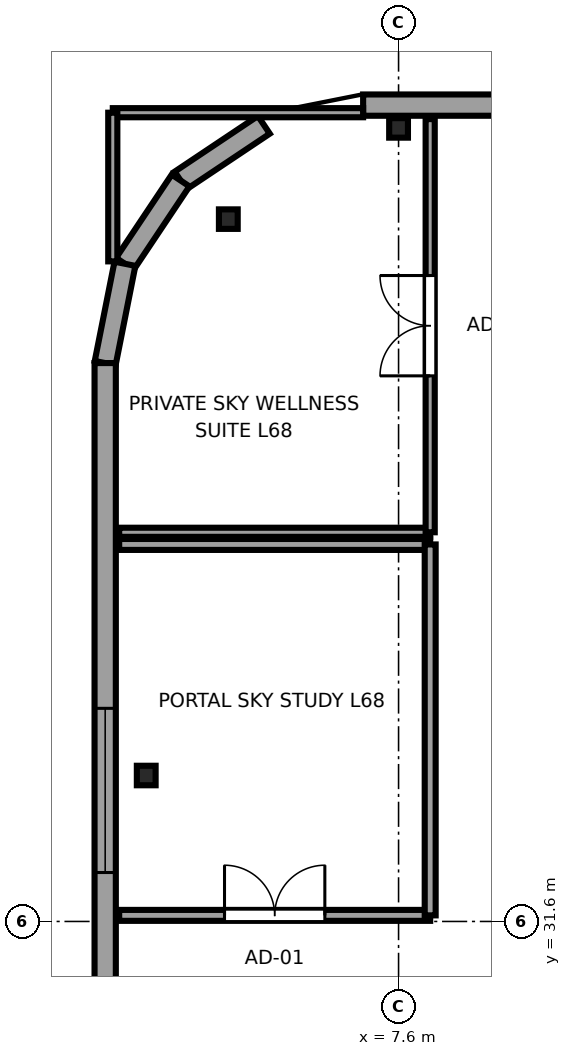
"""IFC4 building model, lengths in metres.
Left out: names, types, materials, properties, quantities, classifications, styles, units other than length and angle.
Written with IfcOpenShell. Run it as: python <this file> out.ifc"""

import sys

from ifc_helpers import new_model, si_unit, direction, frame, frame_2d, origin, origin_2d, place, context, subcontext, project, spatial, rectangle, i_section, extrude, source, transform, mapped, element, fill, save


model = new_model("IFC4")
c1 = context("Model", 3, precision=1e-05, world=origin(), true_north=direction((0.0, 1.0)))
c2 = subcontext(c1, "Body", "Model", "MODEL_VIEW")
j1 = project(units=[si_unit("LENGTHUNIT", "METRE"), si_unit("PLANEANGLEUNIT", "RADIAN")], contexts=[c1])
p1 = place(None, origin())
s1 = spatial("IfcSite", under=j1, at=p1, CompositionType="ELEMENT")
p2 = place(p1, origin())
s2 = spatial("IfcBuilding", under=s1, at=p2, CompositionType="ELEMENT")
p3 = place(p2, frame((0.0, 0.0, 255.85)))
s3 = spatial("IfcBuildingStorey", under=s2, at=p3, CompositionType="ELEMENT", Elevation=255.85)
m1 = source(origin(), c2, "Body", "SweptSolid", [
    extrude(i_section(OverallWidth=0.309, OverallDepth=0.321, WebThickness=0.014, FlangeThickness=0.022, FilletRadius=0.017, at=origin_2d()), origin(), (0.0, 0.0, 1.0), 3.55),
])
for number, where, z_axis, x_axis in (
    (1, (4.8, 43.15, 0.0), (0.0, 0.0, 1.0), (1.0, 0.0, 0.0)),
    (2, (7.6, 44.65, 0.0), (0.0, 0.0, 1.0), (1.0, 0.0, 0.0)),
    (3, (3.45, 34.0, 0.0), (0.0, 0.0, 1.0), (1.0, 0.0, 0.0)),
):
    element("IfcColumn", number, at=place(p3, frame(where, z_axis=z_axis, x_axis=x_axis)), inside=s3, PredefinedType="COLUMN", context=c2, shape_type="MappedRepresentation", body=[
        mapped(m1, transform((0.0, 0.0, 0.0), x_axis=(1.0, 0.0, 0.0), y_axis=(0.0, 1.0, 0.0), z_axis=(0.0, 0.0, 1.0), scale=1.0)),
    ])
p4 = place(p3, frame((9.996, 45.025, 0.0), z_axis=(0.0, 0.0, 1.0), x_axis=(-1.0, 0.0, 0.0)))
e4 = element("IfcWall", 4, at=p4, inside=s3, PredefinedType="SOLIDWALL", context=c2, shape_type="SweptSolid", body=[
    extrude(rectangle(XDim=2.979, YDim=0.35, at=frame_2d((1.49, 0.0))), origin(), (0.0, 0.0, 1.0), 2.16),
])
for number, where, z_axis, x_axis in (
    (5, (5.385, 44.7, 0.0), (0.0, 0.0, 1.0), (-0.832, -0.556, 0.0)),
    (6, (4.015, 43.785, 0.0), (0.0, 0.0, 1.0), (-0.556, -0.831, 0.0)),
):
    element("IfcWall", number, at=place(p3, frame(where, z_axis=z_axis, x_axis=x_axis)), inside=s3, PredefinedType="SOLIDWALL", context=c2, shape_type="SweptSolid", body=[
        extrude(rectangle(XDim=1.647, YDim=0.35, at=frame_2d((0.824, 0.0))), origin(), (0.0, 0.0, 1.0), 2.9),
    ])
p5 = place(p3, frame((3.1, 42.416, 0.0), z_axis=(0.0, 0.0, 1.0), x_axis=(-0.195044345786, -0.980794424524, 0.0)))
e7 = element("IfcWall", 7, at=p5, inside=s3, PredefinedType="SOLIDWALL", context=c2, shape_type="SweptSolid", body=[
    extrude(rectangle(XDim=1.665, YDim=0.35, at=frame_2d((0.833, 0.0))), origin(), (0.0, 0.0, 1.0), 3.37),
])
p6 = place(p3, frame((2.775, 40.783, 0.0), z_axis=(0.0, 0.0, 1.0), x_axis=(0.0, -1.0, 0.0)))
e8 = element("IfcWall", 8, at=p6, inside=s3, PredefinedType="SOLIDWALL", context=c2, shape_type="SweptSolid", body=[
    extrude(rectangle(XDim=33.766, YDim=0.35, at=frame_2d((16.883, 0.0))), origin(), (0.0, 0.0, 1.0), 3.37),
])
p7 = place(p6, frame((5.678, 0.0, 0.68)))
e9 = element("IfcOpeningElement", 9, at=p7, cuts=e8, PredefinedType="OPENING", context=c2, shape_type="SweptSolid", body=[
    extrude(rectangle(XDim=2.7, YDim=1.95, at=frame_2d((1.35, 0.975))), frame((0.0, 0.185, 0.0), z_axis=(0.0, -1.0, 0.0), x_axis=(1.0, 0.0, 0.0)), (0.0, 0.0, 1.0), 0.37),
])
p8 = place(p6, frame((11.431, 0.0, 0.68)))
e10 = element("IfcOpeningElement", 10, at=p8, cuts=e8, PredefinedType="OPENING", context=c2, shape_type="SweptSolid", body=[
    extrude(rectangle(XDim=2.7, YDim=1.95, at=frame_2d((1.35, 0.975))), frame((0.0, 0.185, 0.0), z_axis=(0.0, -1.0, 0.0), x_axis=(1.0, 0.0, 0.0)), (0.0, 0.0, 1.0), 0.37),
])
p9 = place(p6, frame((15.533, 0.0, 0.68)))
e11 = element("IfcOpeningElement", 11, at=p9, cuts=e8, PredefinedType="OPENING", context=c2, shape_type="SweptSolid", body=[
    extrude(rectangle(XDim=2.7, YDim=1.95, at=frame_2d((1.35, 0.975))), frame((0.0, 0.185, 0.0), z_axis=(0.0, -1.0, 0.0), x_axis=(1.0, 0.0, 0.0)), (0.0, 0.0, 1.0), 0.37),
])
p10 = place(p6, frame((20.185, 0.0, 0.68)))
e12 = element("IfcOpeningElement", 12, at=p10, cuts=e8, PredefinedType="OPENING", context=c2, shape_type="SweptSolid", body=[
    extrude(rectangle(XDim=2.7, YDim=1.95, at=frame_2d((1.35, 0.975))), frame((0.0, 0.185, 0.0), z_axis=(0.0, -1.0, 0.0), x_axis=(1.0, 0.0, 0.0)), (0.0, 0.0, 1.0), 0.37),
])
p11 = place(p6, frame((24.837, 0.0, 0.68)))
e13 = element("IfcOpeningElement", 13, at=p11, cuts=e8, PredefinedType="OPENING", context=c2, shape_type="SweptSolid", body=[
    extrude(rectangle(XDim=2.7, YDim=1.95, at=frame_2d((1.35, 0.975))), frame((0.0, 0.185, 0.0), z_axis=(0.0, -1.0, 0.0), x_axis=(1.0, 0.0, 0.0)), (0.0, 0.0, 1.0), 0.37),
])
p12 = place(p6, frame((29.489, 0.0, 0.68)))
e14 = element("IfcOpeningElement", 14, at=p12, cuts=e8, PredefinedType="OPENING", context=c2, shape_type="SweptSolid", body=[
    extrude(rectangle(XDim=2.7, YDim=1.95, at=frame_2d((1.35, 0.975))), frame((0.0, 0.185, 0.0), z_axis=(0.0, -1.0, 0.0), x_axis=(1.0, 0.0, 0.0)), (0.0, 0.0, 1.0), 0.37),
])
p13 = place(p3, frame((3.005, 31.7, 0.0), z_axis=(0.0, 0.0, 1.0), x_axis=(1.0, 0.0, 0.0)))
e15 = element("IfcWall", 15, at=p13, inside=s3, PredefinedType="PARTITIONING", context=c2, shape_type="SweptSolid", body=[
    extrude(rectangle(XDim=5.115, YDim=0.18, at=frame_2d((2.558, 0.0))), origin(), (0.0, 0.0, 1.0), 3.37),
])
p14 = place(p13, frame((1.732, 0.0, 0.0)))
e16 = element("IfcOpeningElement", 16, at=p14, cuts=e15, PredefinedType="OPENING", context=c2, shape_type="SweptSolid", body=[
    extrude(rectangle(XDim=1.65, YDim=2.15, at=frame_2d((0.825, 1.075))), frame((0.0, 0.1, 0.0), z_axis=(0.0, -1.0, 0.0), x_axis=(1.0, 0.0, 0.0)), (0.0, 0.0, 1.0), 0.2),
])
p15 = place(p3, frame((3.005, 37.8, 0.0), z_axis=(0.0, 0.0, 1.0), x_axis=(1.0, 0.0, 0.0)))
e17 = element("IfcWall", 17, at=p15, inside=s3, PredefinedType="PARTITIONING", context=c2, shape_type="SweptSolid", body=[
    extrude(rectangle(XDim=5.115, YDim=0.18, at=frame_2d((2.558, 0.0))), origin(), (0.0, 0.0, 1.0), 3.37),
])
p16 = place(p3, frame((8.12, 31.7, 0.0), z_axis=(0.0, 0.0, 1.0), x_axis=(0.0, 1.0, 0.0)))
e18 = element("IfcWall", 18, at=p16, inside=s3, PredefinedType="PARTITIONING", context=c2, shape_type="SweptSolid", body=[
    extrude(rectangle(XDim=6.1, YDim=0.18, at=frame_2d((3.05, 0.0))), origin(), (0.0, 0.0, 1.0), 3.37),
])
p17 = place(p3, frame((3.005, 38.0, 0.0), z_axis=(0.0, 0.0, 1.0), x_axis=(1.0, 0.0, 0.0)))
e19 = element("IfcWall", 19, at=p17, inside=s3, PredefinedType="PARTITIONING", context=c2, shape_type="SweptSolid", body=[
    extrude(rectangle(XDim=5.115, YDim=0.15, at=frame_2d((2.558, 0.0))), origin(), (0.0, 0.0, 1.0), 3.37),
])
p18 = place(p3, frame((2.9, 44.9, 0.0), z_axis=(0.0, 0.0, 1.0), x_axis=(1.0, 0.0, 0.0)))
e20 = element("IfcWall", 20, at=p18, inside=s3, PredefinedType="PARTITIONING", context=c2, shape_type="SweptSolid", body=[
    extrude(rectangle(XDim=4.117, YDim=0.15, at=frame_2d((2.059, 0.0))), origin(), (0.0, 0.0, 1.0), 3.37),
])
p19 = place(p3, frame((2.9, 42.455, 0.0), z_axis=(0.0, 0.0, 1.0), x_axis=(0.0, 1.0, 0.0)))
e21 = element("IfcWall", 21, at=p19, inside=s3, PredefinedType="PARTITIONING", context=c2, shape_type="SweptSolid", body=[
    extrude(rectangle(XDim=2.445, YDim=0.15, at=frame_2d((1.222, 0.0))), origin(), (0.0, 0.0, 1.0), 3.37),
])
p20 = place(p3, frame((8.12, 38.0, 0.0), z_axis=(0.0, 0.0, 1.0), x_axis=(0.0, 1.0, 0.0)))
e22 = element("IfcWall", 22, at=p20, inside=s3, PredefinedType="PARTITIONING", context=c2, shape_type="SweptSolid", body=[
    extrude(rectangle(XDim=6.795, YDim=0.15, at=frame_2d((3.397, 0.0))), origin(), (0.0, 0.0, 1.0), 3.37),
])
p21 = place(p20, frame((2.573, 0.0, 0.0)))
e23 = element("IfcOpeningElement", 23, at=p21, cuts=e22, PredefinedType="OPENING", context=c2, shape_type="SweptSolid", body=[
    extrude(rectangle(XDim=1.65, YDim=2.15, at=frame_2d((0.825, 1.075))), frame((0.0, 0.085, 0.0), z_axis=(0.0, -1.0, 0.0), x_axis=(1.0, 0.0, 0.0)), (0.0, 0.0, 1.0), 0.17),
])
m2 = source(origin(), c2, "Body", "SweptSolid", [
    extrude(rectangle(XDim=2.7, YDim=1.95, at=frame_2d((1.35, 0.975))), frame((0.0, 0.09, 0.0), z_axis=(0.0, -1.0, 0.0), x_axis=(1.0, 0.0, 0.0)), (0.0, 0.0, 1.0), 0.06),
])
p22 = place(p7, origin())
e24 = element("IfcWindow", 24, at=p22, inside=s3, PartitioningType="TRIPLE_PANEL_HORIZONTAL", PredefinedType="WINDOW", context=c2, shape_type="MappedRepresentation", body=[
    mapped(m2, transform((0.0, 0.0, 0.0), x_axis=(1.0, 0.0, 0.0), y_axis=(0.0, 1.0, 0.0), z_axis=(0.0, 0.0, 1.0), scale=1.0)),
])
fill(e9, e24)
m3 = source(origin(), c2, "Body", "SweptSolid", [
    extrude(rectangle(XDim=1.65, YDim=2.15, at=frame_2d((0.825, 1.075))), frame((0.0, 0.025, 0.0), z_axis=(0.0, -1.0, 0.0), x_axis=(1.0, 0.0, 0.0)), (0.0, 0.0, 1.0), 0.05),
])
p23 = place(p14, origin())
e25 = element("IfcDoor", 25, at=p23, inside=s3, OperationType="DOUBLE_DOOR_SINGLE_SWING", PredefinedType="DOOR", context=c2, shape_type="MappedRepresentation", body=[
    mapped(m3, transform((0.0, 0.0, 0.0), x_axis=(1.0, 0.0, 0.0), y_axis=(0.0, 1.0, 0.0), z_axis=(0.0, 0.0, 1.0), scale=1.0)),
])
fill(e16, e25)
p24 = place(p21, origin())
e26 = element("IfcDoor", 26, at=p24, inside=s3, OperationType="DOUBLE_DOOR_SINGLE_SWING", PredefinedType="DOOR", context=c2, shape_type="MappedRepresentation", body=[
    mapped(m3, transform((0.0, 0.0, 0.0), x_axis=(1.0, 0.0, 0.0), y_axis=(0.0, 1.0, 0.0), z_axis=(0.0, 0.0, 1.0), scale=1.0)),
])
fill(e23, e26)
save(model, sys.argv[1])
